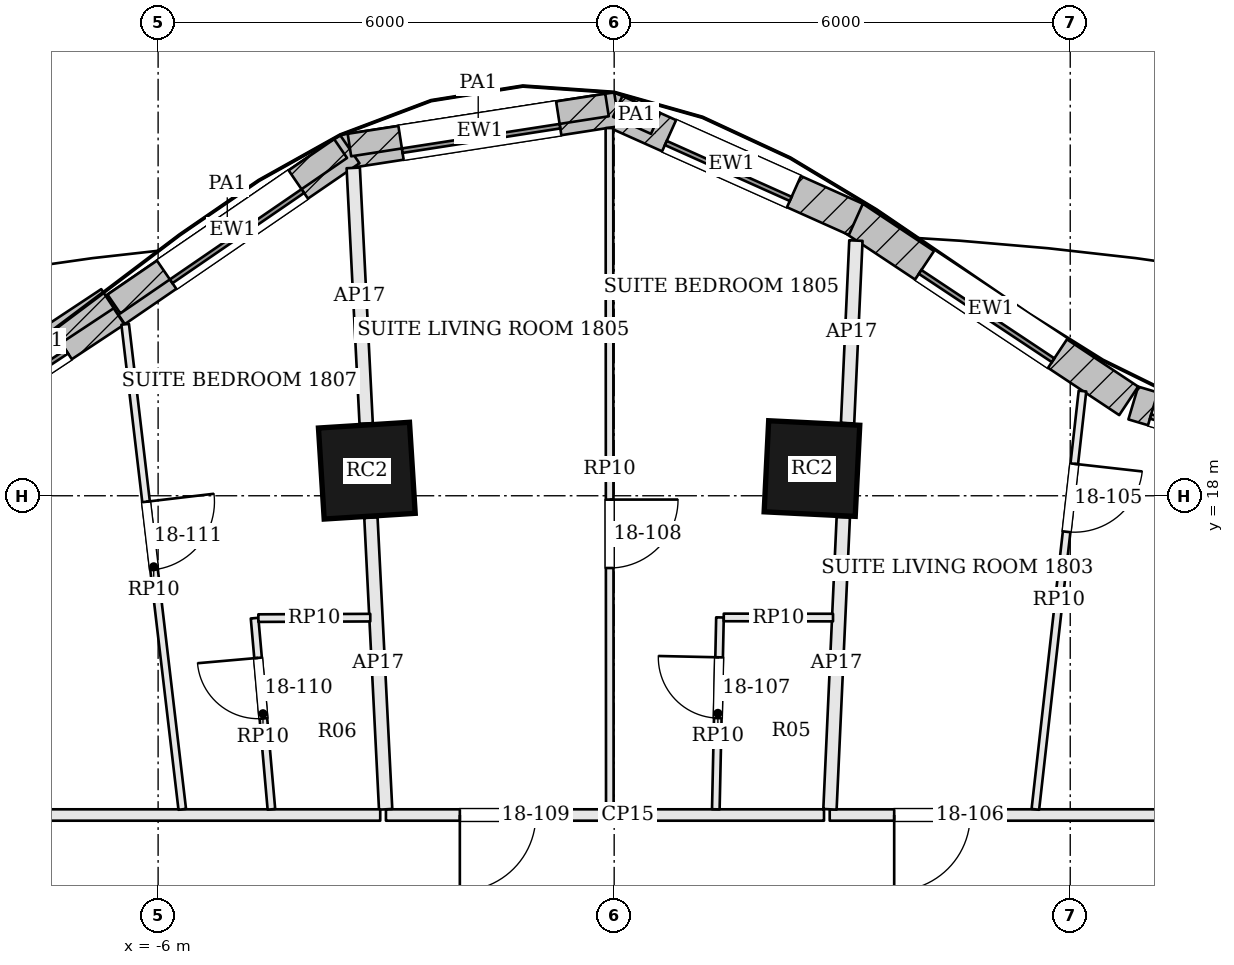
"""IFC4 building model, lengths in metres.
Left out: names, types, materials, properties, quantities, classifications, styles, units other than length and angle.
Written with IfcOpenShell. Run it as: python <this file> out.ifc"""

import sys

from ifc_helpers import new_model, si_unit, direction, frame, frame_2d, origin, origin_2d, place, context, subcontext, project, spatial, rectangle, extrude, element, fill, save


model = new_model("IFC4")
c1 = context("Model", 3, precision=1e-05, world=origin(), true_north=direction((0.0, 1.0)))
c2 = subcontext(c1, "Body", "Model", "MODEL_VIEW")
j1 = project(units=[si_unit("LENGTHUNIT", "METRE"), si_unit("PLANEANGLEUNIT", "RADIAN")], contexts=[c1])
p1 = place(None, origin())
s1 = spatial("IfcSite", under=j1, at=p1, CompositionType="ELEMENT")
p2 = place(p1, origin())
s2 = spatial("IfcBuilding", under=s1, at=p2, CompositionType="ELEMENT")
p3 = place(p2, frame((0.0, 0.0, 81.6)))
s3 = spatial("IfcBuildingStorey", under=s2, at=p3, CompositionType="ELEMENT", Elevation=81.6)
for number, where, z_axis, x_axis in (
    (1, (2.602, 18.358, -0.7), (0.0, 0.0, 1.0), (-0.999, 0.05, 0.0)),
    (2, (-3.254, 18.33, -0.7), (0.0, 0.0, 1.0), (-0.998, -0.063, 0.0)),
):
    element("IfcColumn", number, at=place(p3, frame(where, z_axis=z_axis, x_axis=x_axis)), inside=s3, PredefinedType="COLUMN", context=c2, shape_type="SweptSolid", body=[
        extrude(rectangle(XDim=1.2, YDim=1.2, at=origin_2d()), origin(), (0.0, 0.0, 1.0), 4.3),
    ])
p4 = place(p3, frame((9.357, 18.469, 0.0), z_axis=(0.0, 0.0, 1.0), x_axis=(-0.958524054629, 0.285011643091, 0.0)))
e3 = element("IfcWall", 3, at=p4, inside=s3, PredefinedType="SOLIDWALL", context=c2, shape_type="SweptSolid", body=[
    extrude(rectangle(XDim=2.637, YDim=0.45, at=frame_2d((1.319, 0.0))), origin(), (0.0, 0.0, 1.0), 3.4),
])
p5 = place(p4, frame((0.269, 0.0, 0.9)))
e4 = element("IfcOpeningElement", 4, at=p5, cuts=e3, PredefinedType="OPENING", context=c2, shape_type="SweptSolid", body=[
    extrude(rectangle(XDim=2.1, YDim=2.0, at=frame_2d((1.05, 1.0))), frame((0.0, 0.235, 0.0), z_axis=(0.0, -1.0, 0.0), x_axis=(1.0, 0.0, 0.0)), (0.0, 0.0, 1.0), 0.47),
])
p6 = place(p3, frame((6.769, 19.248, 0.0), z_axis=(0.0, 0.0, 1.0), x_axis=(-0.832973379274, 0.553313066375, 0.0)))
e5 = element("IfcWall", 5, at=p6, inside=s3, PredefinedType="SOLIDWALL", context=c2, shape_type="SweptSolid", body=[
    extrude(rectangle(XDim=4.348, YDim=0.45, at=frame_2d((2.174, 0.0))), origin(), (0.0, 0.0, 1.0), 3.4),
])
p7 = place(p6, frame((1.124, 0.0, 0.9)))
e6 = element("IfcOpeningElement", 6, at=p7, cuts=e5, PredefinedType="OPENING", context=c2, shape_type="SweptSolid", body=[
    extrude(rectangle(XDim=2.1, YDim=2.0, at=frame_2d((1.05, 1.0))), frame((0.0, 0.235, 0.0), z_axis=(0.0, -1.0, 0.0), x_axis=(1.0, 0.0, 0.0)), (0.0, 0.0, 1.0), 0.47),
])
p8 = place(p3, frame((3.179, 21.636, 0.0), z_axis=(0.0, 0.0, 1.0), x_axis=(-0.912608353595, 0.40883492139, 0.0)))
e7 = element("IfcWall", 7, at=p8, inside=s3, PredefinedType="SOLIDWALL", context=c2, shape_type="SweptSolid", body=[
    extrude(rectangle(XDim=3.585, YDim=0.45, at=frame_2d((1.792, 0.0))), origin(), (0.0, 0.0, 1.0), 3.4),
])
p9 = place(p8, frame((0.892, 0.0, 0.9)))
e8 = element("IfcOpeningElement", 8, at=p9, cuts=e7, PredefinedType="OPENING", context=c2, shape_type="SweptSolid", body=[
    extrude(rectangle(XDim=1.8, YDim=2.0, at=frame_2d((0.9, 1.0))), frame((0.0, 0.235, 0.0), z_axis=(0.0, -1.0, 0.0), x_axis=(1.0, 0.0, 0.0)), (0.0, 0.0, 1.0), 0.47),
])
p10 = place(p3, frame((0.035, 23.085, 0.0), z_axis=(0.0, 0.0, 1.0), x_axis=(-0.988133637562, -0.153596596054, 0.0)))
e9 = element("IfcWall", 9, at=p10, inside=s3, PredefinedType="SOLIDWALL", context=c2, shape_type="SweptSolid", body=[
    extrude(rectangle(XDim=3.646, YDim=0.45, at=frame_2d((1.823, 0.0))), origin(), (0.0, 0.0, 1.0), 3.4),
])
p11 = place(p10, frame((0.773, 0.0, 0.9)))
e10 = element("IfcOpeningElement", 10, at=p11, cuts=e9, PredefinedType="OPENING", context=c2, shape_type="SweptSolid", body=[
    extrude(rectangle(XDim=2.1, YDim=2.0, at=frame_2d((1.05, 1.0))), frame((0.0, 0.235, 0.0), z_axis=(0.0, -1.0, 0.0), x_axis=(1.0, 0.0, 0.0)), (0.0, 0.0, 1.0), 0.47),
])
p12 = place(p3, frame((-3.479, 22.56, 0.0), z_axis=(0.0, 0.0, 1.0), x_axis=(-0.824722766417, -0.565537230033, 0.0)))
e11 = element("IfcWall", 11, at=p12, inside=s3, PredefinedType="SOLIDWALL", context=c2, shape_type="SweptSolid", body=[
    extrude(rectangle(XDim=3.742, YDim=0.45, at=frame_2d((1.871, 0.0))), origin(), (0.0, 0.0, 1.0), 3.4),
])
p13 = place(p12, frame((0.821, 0.0, 0.9)))
e12 = element("IfcOpeningElement", 12, at=p13, cuts=e11, PredefinedType="OPENING", context=c2, shape_type="SweptSolid", body=[
    extrude(rectangle(XDim=2.1, YDim=2.0, at=frame_2d((1.05, 1.0))), frame((0.0, 0.235, 0.0), z_axis=(0.0, -1.0, 0.0), x_axis=(1.0, 0.0, 0.0)), (0.0, 0.0, 1.0), 0.47),
])
p14 = place(p3, frame((-6.568, 20.441, 0.0), z_axis=(0.0, 0.0, 1.0), x_axis=(-0.834034214531, -0.551712723246, 0.0)))
e13 = element("IfcWall", 13, at=p14, inside=s3, PredefinedType="SOLIDWALL", context=c2, shape_type="SweptSolid", body=[
    extrude(rectangle(XDim=3.757, YDim=0.45, at=frame_2d((1.879, 0.0))), origin(), (0.0, 0.0, 1.0), 3.4),
])
p15 = place(p14, frame((0.829, 0.0, 0.9)))
e14 = element("IfcOpeningElement", 14, at=p15, cuts=e13, PredefinedType="OPENING", context=c2, shape_type="SweptSolid", body=[
    extrude(rectangle(XDim=2.1, YDim=2.0, at=frame_2d((1.05, 1.0))), frame((0.0, 0.235, 0.0), z_axis=(0.0, -1.0, 0.0), x_axis=(1.0, 0.0, 0.0)), (0.0, 0.0, 1.0), 0.47),
])
p16 = place(p3, frame((0.545, 22.898, 3.6), z_axis=(0.0, 0.0, 1.0), x_axis=(-0.912497815069, 0.409081578044, 0.0)))
e15 = element("IfcWall", 15, at=p16, inside=s3, PredefinedType="PARAPET", context=c2, shape_type="SweptSolid", body=[
    extrude(rectangle(XDim=0.546, YDim=0.3, at=frame_2d((0.273, 0.0))), origin(), (0.0, 0.0, 1.0), 1.1),
])
p17 = place(p3, frame((-0.094, 23.14, 3.6), z_axis=(0.0, 0.0, 1.0), x_axis=(-0.988150084887, -0.153490748056, 0.0)))
e16 = element("IfcWall", 16, at=p17, inside=s3, PredefinedType="PARAPET", context=c2, shape_type="SweptSolid", body=[
    extrude(rectangle(XDim=3.429, YDim=0.3, at=frame_2d((1.715, 0.0))), origin(), (0.0, 0.0, 1.0), 1.1),
])
p18 = place(p3, frame((-3.599, 22.568, 3.6), z_axis=(0.0, 0.0, 1.0), x_axis=(-0.82476034254, -0.565482428881, 0.0)))
e17 = element("IfcWall", 17, at=p18, inside=s3, PredefinedType="PARAPET", context=c2, shape_type="SweptSolid", body=[
    extrude(rectangle(XDim=3.616, YDim=0.3, at=frame_2d((1.808, 0.0))), origin(), (0.0, 0.0, 1.0), 1.1),
])
p19 = place(p3, frame((-6.665, 20.593, 3.6), z_axis=(0.0, 0.0, 1.0), x_axis=(-0.834027642059, -0.551722658843, 0.0)))
e18 = element("IfcWall", 18, at=p19, inside=s3, PredefinedType="PARAPET", context=c2, shape_type="SweptSolid", body=[
    extrude(rectangle(XDim=2.008, YDim=0.3, at=frame_2d((1.004, 0.0))), origin(), (0.0, 0.0, 1.0), 1.1),
])
p20 = place(p3, frame((14.725, 13.8, 0.0), z_axis=(0.0, 0.0, 1.0), x_axis=(-1.0, 0.0, 0.0)))
e19 = element("IfcWall", 19, at=p20, inside=s3, PredefinedType="PARTITIONING", context=c2, shape_type="SweptSolid", body=[
    extrude(rectangle(XDim=11.889, YDim=0.15, at=frame_2d((5.945, 0.0))), origin(), (0.0, 0.0, 1.0), 2.784),
])
p21 = place(p20, frame((10.041, 0.0, 0.0)))
e20 = element("IfcOpeningElement", 20, at=p21, cuts=e19, PredefinedType="OPENING", context=c2, shape_type="SweptSolid", body=[
    extrude(rectangle(XDim=1.0, YDim=2.1, at=frame_2d((0.5, 1.05))), frame((0.0, 0.085, 0.0), z_axis=(0.0, -1.0, 0.0), x_axis=(1.0, 0.0, 0.0)), (0.0, 0.0, 1.0), 0.17),
])
p22 = place(p3, frame((3.18, 21.357, 0.0), z_axis=(0.0, 0.0, 1.0), x_axis=(-0.045591899448, -0.998960148707, 0.0)))
e21 = element("IfcWall", 21, at=p22, inside=s3, PredefinedType="PARTITIONING", context=c2, shape_type="SweptSolid", body=[
    extrude(rectangle(XDim=2.404, YDim=0.175, at=frame_2d((1.202, 0.0))), origin(), (0.0, 0.0, 1.0), 2.784),
])
p23 = place(p3, frame((3.014, 17.717, 0.0), z_axis=(0.0, 0.0, 1.0), x_axis=(-0.045517086473, -0.998963560316, 0.0)))
e22 = element("IfcWall", 22, at=p23, inside=s3, PredefinedType="PARTITIONING", context=c2, shape_type="SweptSolid", body=[
    extrude(rectangle(XDim=3.846, YDim=0.175, at=frame_2d((1.923, 0.0))), origin(), (0.0, 0.0, 1.0), 2.784),
])
p24 = place(p3, frame((2.76, 13.8, 0.0), z_axis=(0.0, 0.0, 1.0), x_axis=(-1.0, 0.0, 0.0)))
e23 = element("IfcWall", 23, at=p24, inside=s3, PredefinedType="PARTITIONING", context=c2, shape_type="SweptSolid", body=[
    extrude(rectangle(XDim=5.763, YDim=0.15, at=frame_2d((2.882, 0.0))), origin(), (0.0, 0.0, 1.0), 2.784),
])
p25 = place(p24, frame((3.791, 0.0, 0.0)))
e24 = element("IfcOpeningElement", 24, at=p25, cuts=e23, PredefinedType="OPENING", context=c2, shape_type="SweptSolid", body=[
    extrude(rectangle(XDim=1.0, YDim=2.1, at=frame_2d((0.5, 1.05))), frame((0.0, 0.085, 0.0), z_axis=(0.0, -1.0, 0.0), x_axis=(1.0, 0.0, 0.0)), (0.0, 0.0, 1.0), 0.17),
])
p26 = place(p3, frame((-3.433, 22.313, 0.0), z_axis=(0.0, 0.0, 1.0), x_axis=(0.05046925348, -0.998725615198, 0.0)))
e25 = element("IfcWall", 25, at=p26, inside=s3, PredefinedType="PARTITIONING", context=c2, shape_type="SweptSolid", body=[
    extrude(rectangle(XDim=3.367, YDim=0.175, at=frame_2d((1.684, 0.0))), origin(), (0.0, 0.0, 1.0), 2.784),
])
p27 = place(p3, frame((-3.2, 17.712, 0.0), z_axis=(0.0, 0.0, 1.0), x_axis=(0.050454205139, -0.998726375532, 0.0)))
e26 = element("IfcWall", 26, at=p27, inside=s3, PredefinedType="PARTITIONING", context=c2, shape_type="SweptSolid", body=[
    extrude(rectangle(XDim=3.842, YDim=0.175, at=frame_2d((1.921, 0.0))), origin(), (0.0, 0.0, 1.0), 2.784),
])
p28 = place(p3, frame((-3.078, 13.8, 0.0), z_axis=(0.0, 0.0, 1.0), x_axis=(-1.0, 0.0, 0.0)))
e27 = element("IfcWall", 27, at=p28, inside=s3, PredefinedType="PARTITIONING", context=c2, shape_type="SweptSolid", body=[
    extrude(rectangle(XDim=11.722, YDim=0.15, at=frame_2d((5.861, 0.0))), origin(), (0.0, 0.0, 1.0), 2.784),
])
p29 = place(p28, frame((7.719, 0.0, 0.0)))
e28 = element("IfcOpeningElement", 28, at=p29, cuts=e27, PredefinedType="OPENING", context=c2, shape_type="SweptSolid", body=[
    extrude(rectangle(XDim=1.0, YDim=2.1, at=frame_2d((0.5, 1.05))), frame((0.0, 0.085, 0.0), z_axis=(0.0, -1.0, 0.0), x_axis=(1.0, 0.0, 0.0)), (0.0, 0.0, 1.0), 0.17),
])
p30 = place(p3, frame((6.161, 19.377, 0.0), z_axis=(0.0, 0.0, 1.0), x_axis=(-0.11193626313, -0.993715388326, 0.0)))
e29 = element("IfcWall", 29, at=p30, inside=s3, PredefinedType="PARTITIONING", context=c2, shape_type="SweptSolid", body=[
    extrude(rectangle(XDim=5.538, YDim=0.1, at=frame_2d((2.769, 0.0))), origin(), (0.0, 0.0, 1.0), 2.784),
])
p31 = place(p30, frame((0.963, 0.0, 0.0)))
e30 = element("IfcOpeningElement", 30, at=p31, cuts=e29, PredefinedType="OPENING", context=c2, shape_type="SweptSolid", body=[
    extrude(rectangle(XDim=0.9, YDim=2.4, at=frame_2d((0.45, 1.2))), frame((0.0, 0.06, 0.0), z_axis=(0.0, -1.0, 0.0), x_axis=(1.0, 0.0, 0.0)), (0.0, 0.0, 1.0), 0.12),
])
p32 = place(p3, frame((-0.062, 22.837, 0.0), z_axis=(0.0, 0.0, 1.0), x_axis=(0.000599291639, -0.999999820425, 0.0)))
e31 = element("IfcWall", 31, at=p32, inside=s3, PredefinedType="PARTITIONING", context=c2, shape_type="SweptSolid", body=[
    extrude(rectangle(XDim=8.962, YDim=0.1, at=frame_2d((4.481, 0.0))), origin(), (0.0, 0.0, 1.0), 2.784),
])
p33 = place(p32, frame((4.888, 0.0, 0.0)))
e32 = element("IfcOpeningElement", 32, at=p33, cuts=e31, PredefinedType="OPENING", context=c2, shape_type="SweptSolid", body=[
    extrude(rectangle(XDim=0.9, YDim=2.4, at=frame_2d((0.45, 1.2))), frame((0.0, 0.06, 0.0), z_axis=(0.0, -1.0, 0.0), x_axis=(1.0, 0.0, 0.0)), (0.0, 0.0, 1.0), 0.12),
])
p34 = place(p3, frame((1.337, 13.875, 0.0), z_axis=(0.0, 0.0, 1.0), x_axis=(0.02165836135, 0.99976543018, 0.0)))
e33 = element("IfcWall", 33, at=p34, inside=s3, PredefinedType="PARTITIONING", context=c2, shape_type="SweptSolid", body=[
    extrude(rectangle(XDim=2.525, YDim=0.1, at=frame_2d((1.262, 0.0))), origin(), (0.0, 0.0, 1.0), 2.784),
])
p35 = place(p34, frame((1.2, 0.0, 0.0)))
e34 = element("IfcOpeningElement", 34, at=p35, cuts=e33, PredefinedType="OPENING", context=c2, shape_type="SweptSolid", body=[
    extrude(rectangle(XDim=0.8, YDim=2.1, at=frame_2d((0.4, 1.05))), frame((0.0, 0.06, 0.0), z_axis=(0.0, -1.0, 0.0), x_axis=(1.0, 0.0, 0.0)), (0.0, 0.0, 1.0), 0.12),
])
p36 = place(p3, frame((1.442, 16.399, 0.0), z_axis=(0.0, 0.0, 1.0), x_axis=(0.999999076661, -0.001358925193, 0.0)))
e35 = element("IfcWall", 35, at=p36, inside=s3, PredefinedType="PARTITIONING", context=c2, shape_type="SweptSolid", body=[
    extrude(rectangle(XDim=1.437, YDim=0.1, at=frame_2d((0.719, 0.0))), origin(), (0.0, 0.0, 1.0), 2.784),
])
p37 = place(p3, frame((-6.433, 20.256, 0.0), z_axis=(0.0, 0.0, 1.0), x_axis=(0.116872110209, -0.993146972938, 0.0)))
e36 = element("IfcWall", 36, at=p37, inside=s3, PredefinedType="PARTITIONING", context=c2, shape_type="SweptSolid", body=[
    extrude(rectangle(XDim=6.426, YDim=0.1, at=frame_2d((3.213, 0.0))), origin(), (0.0, 0.0, 1.0), 2.784),
])
p38 = place(p37, frame((2.351, 0.0, 0.0)))
e37 = element("IfcOpeningElement", 37, at=p38, cuts=e36, PredefinedType="OPENING", context=c2, shape_type="SweptSolid", body=[
    extrude(rectangle(XDim=0.9, YDim=2.4, at=frame_2d((0.45, 1.2))), frame((0.0, 0.06, 0.0), z_axis=(0.0, -1.0, 0.0), x_axis=(1.0, 0.0, 0.0)), (0.0, 0.0, 1.0), 0.12),
])
p39 = place(p3, frame((-4.51, 13.875, 0.0), z_axis=(0.0, 0.0, 1.0), x_axis=(-0.087797863197, 0.996138311289, 0.0)))
e38 = element("IfcWall", 38, at=p39, inside=s3, PredefinedType="PARTITIONING", context=c2, shape_type="SweptSolid", body=[
    extrude(rectangle(XDim=2.525, YDim=0.1, at=frame_2d((1.262, 0.0))), origin(), (0.0, 0.0, 1.0), 2.784),
])
p40 = place(p39, frame((1.2, 0.0, 0.0)))
e39 = element("IfcOpeningElement", 39, at=p40, cuts=e38, PredefinedType="OPENING", context=c2, shape_type="SweptSolid", body=[
    extrude(rectangle(XDim=0.8, YDim=2.1, at=frame_2d((0.4, 1.05))), frame((0.0, 0.06, 0.0), z_axis=(0.0, -1.0, 0.0), x_axis=(1.0, 0.0, 0.0)), (0.0, 0.0, 1.0), 0.12),
])
p41 = place(p3, frame((-4.681, 16.39, 0.0), z_axis=(0.0, 0.0, 1.0), x_axis=(0.99999070443, 0.004311734381, 0.0)))
e40 = element("IfcWall", 40, at=p41, inside=s3, PredefinedType="PARTITIONING", context=c2, shape_type="SweptSolid", body=[
    extrude(rectangle(XDim=1.472, YDim=0.1, at=frame_2d((0.736, 0.0))), origin(), (0.0, 0.0, 1.0), 2.784),
])
p42 = place(p5, origin())
e41 = element("IfcWindow", 41, at=p42, inside=s3, PartitioningType="SINGLE_PANEL", PredefinedType="WINDOW", context=c2, shape_type="SweptSolid", body=[
    extrude(rectangle(XDim=2.1, YDim=2.0, at=frame_2d((1.05, 1.0))), frame((0.0, 0.135, 0.0), z_axis=(0.0, -1.0, 0.0), x_axis=(1.0, 0.0, 0.0)), (0.0, 0.0, 1.0), 0.06),
])
fill(e4, e41)
p43 = place(p7, origin())
e42 = element("IfcWindow", 42, at=p43, inside=s3, PartitioningType="SINGLE_PANEL", PredefinedType="WINDOW", context=c2, shape_type="SweptSolid", body=[
    extrude(rectangle(XDim=2.1, YDim=2.0, at=frame_2d((1.05, 1.0))), frame((0.0, 0.135, 0.0), z_axis=(0.0, -1.0, 0.0), x_axis=(1.0, 0.0, 0.0)), (0.0, 0.0, 1.0), 0.06),
])
fill(e6, e42)
p44 = place(p9, origin())
e43 = element("IfcWindow", 43, at=p44, inside=s3, PartitioningType="SINGLE_PANEL", PredefinedType="WINDOW", context=c2, shape_type="SweptSolid", body=[
    extrude(rectangle(XDim=1.8, YDim=2.0, at=frame_2d((0.9, 1.0))), frame((0.0, 0.135, 0.0), z_axis=(0.0, -1.0, 0.0), x_axis=(1.0, 0.0, 0.0)), (0.0, 0.0, 1.0), 0.06),
])
fill(e8, e43)
p45 = place(p11, origin())
e44 = element("IfcWindow", 44, at=p45, inside=s3, PartitioningType="SINGLE_PANEL", PredefinedType="WINDOW", context=c2, shape_type="SweptSolid", body=[
    extrude(rectangle(XDim=2.1, YDim=2.0, at=frame_2d((1.05, 1.0))), frame((0.0, 0.135, 0.0), z_axis=(0.0, -1.0, 0.0), x_axis=(1.0, 0.0, 0.0)), (0.0, 0.0, 1.0), 0.06),
])
fill(e10, e44)
p46 = place(p13, origin())
e45 = element("IfcWindow", 45, at=p46, inside=s3, PartitioningType="SINGLE_PANEL", PredefinedType="WINDOW", context=c2, shape_type="SweptSolid", body=[
    extrude(rectangle(XDim=2.1, YDim=2.0, at=frame_2d((1.05, 1.0))), frame((0.0, 0.135, 0.0), z_axis=(0.0, -1.0, 0.0), x_axis=(1.0, 0.0, 0.0)), (0.0, 0.0, 1.0), 0.06),
])
fill(e12, e45)
p47 = place(p15, origin())
e46 = element("IfcWindow", 46, at=p47, inside=s3, PartitioningType="SINGLE_PANEL", PredefinedType="WINDOW", context=c2, shape_type="SweptSolid", body=[
    extrude(rectangle(XDim=2.1, YDim=2.0, at=frame_2d((1.05, 1.0))), frame((0.0, 0.135, 0.0), z_axis=(0.0, -1.0, 0.0), x_axis=(1.0, 0.0, 0.0)), (0.0, 0.0, 1.0), 0.06),
])
fill(e14, e46)
p48 = place(p31, origin())
e47 = element("IfcDoor", 47, at=p48, inside=s3, OperationType="SINGLE_SWING_LEFT", PredefinedType="DOOR", context=c2, shape_type="SweptSolid", body=[
    extrude(rectangle(XDim=0.9, YDim=2.4, at=frame_2d((0.45, 1.2))), frame((0.0, 0.025, 0.0), z_axis=(0.0, -1.0, 0.0), x_axis=(1.0, 0.0, 0.0)), (0.0, 0.0, 1.0), 0.05),
])
fill(e30, e47)
p49 = place(p21, origin())
e48 = element("IfcDoor", 48, at=p49, inside=s3, OperationType="SINGLE_SWING_RIGHT", PredefinedType="DOOR", context=c2, shape_type="SweptSolid", body=[
    extrude(rectangle(XDim=1.0, YDim=2.1, at=frame_2d((0.5, 1.05))), frame((0.0, 0.025, 0.0), z_axis=(0.0, -1.0, 0.0), x_axis=(1.0, 0.0, 0.0)), (0.0, 0.0, 1.0), 0.05),
])
fill(e20, e48)
p50 = place(p35, origin())
e49 = element("IfcDoor", 49, at=p50, inside=s3, OperationType="SINGLE_SWING_RIGHT", PredefinedType="DOOR", context=c2, shape_type="SweptSolid", body=[
    extrude(rectangle(XDim=0.8, YDim=2.1, at=frame_2d((0.4, 1.05))), frame((0.0, 0.025, 0.0), z_axis=(0.0, -1.0, 0.0), x_axis=(1.0, 0.0, 0.0)), (0.0, 0.0, 1.0), 0.05),
])
fill(e34, e49)
p51 = place(p33, origin())
e50 = element("IfcDoor", 50, at=p51, inside=s3, OperationType="SINGLE_SWING_LEFT", PredefinedType="DOOR", context=c2, shape_type="SweptSolid", body=[
    extrude(rectangle(XDim=0.9, YDim=2.4, at=frame_2d((0.45, 1.2))), frame((0.0, 0.025, 0.0), z_axis=(0.0, -1.0, 0.0), x_axis=(1.0, 0.0, 0.0)), (0.0, 0.0, 1.0), 0.05),
])
fill(e32, e50)
p52 = place(p25, origin())
e51 = element("IfcDoor", 51, at=p52, inside=s3, OperationType="SINGLE_SWING_RIGHT", PredefinedType="DOOR", context=c2, shape_type="SweptSolid", body=[
    extrude(rectangle(XDim=1.0, YDim=2.1, at=frame_2d((0.5, 1.05))), frame((0.0, 0.025, 0.0), z_axis=(0.0, -1.0, 0.0), x_axis=(1.0, 0.0, 0.0)), (0.0, 0.0, 1.0), 0.05),
])
fill(e24, e51)
p53 = place(p40, origin())
e52 = element("IfcDoor", 52, at=p53, inside=s3, OperationType="SINGLE_SWING_RIGHT", PredefinedType="DOOR", context=c2, shape_type="SweptSolid", body=[
    extrude(rectangle(XDim=0.8, YDim=2.1, at=frame_2d((0.4, 1.05))), frame((0.0, 0.025, 0.0), z_axis=(0.0, -1.0, 0.0), x_axis=(1.0, 0.0, 0.0)), (0.0, 0.0, 1.0), 0.05),
])
fill(e39, e52)
p54 = place(p38, origin())
e53 = element("IfcDoor", 53, at=p54, inside=s3, OperationType="SINGLE_SWING_LEFT", PredefinedType="DOOR", context=c2, shape_type="SweptSolid", body=[
    extrude(rectangle(XDim=0.9, YDim=2.4, at=frame_2d((0.45, 1.2))), frame((0.0, 0.025, 0.0), z_axis=(0.0, -1.0, 0.0), x_axis=(1.0, 0.0, 0.0)), (0.0, 0.0, 1.0), 0.05),
])
fill(e37, e53)
save(model, sys.argv[1])
